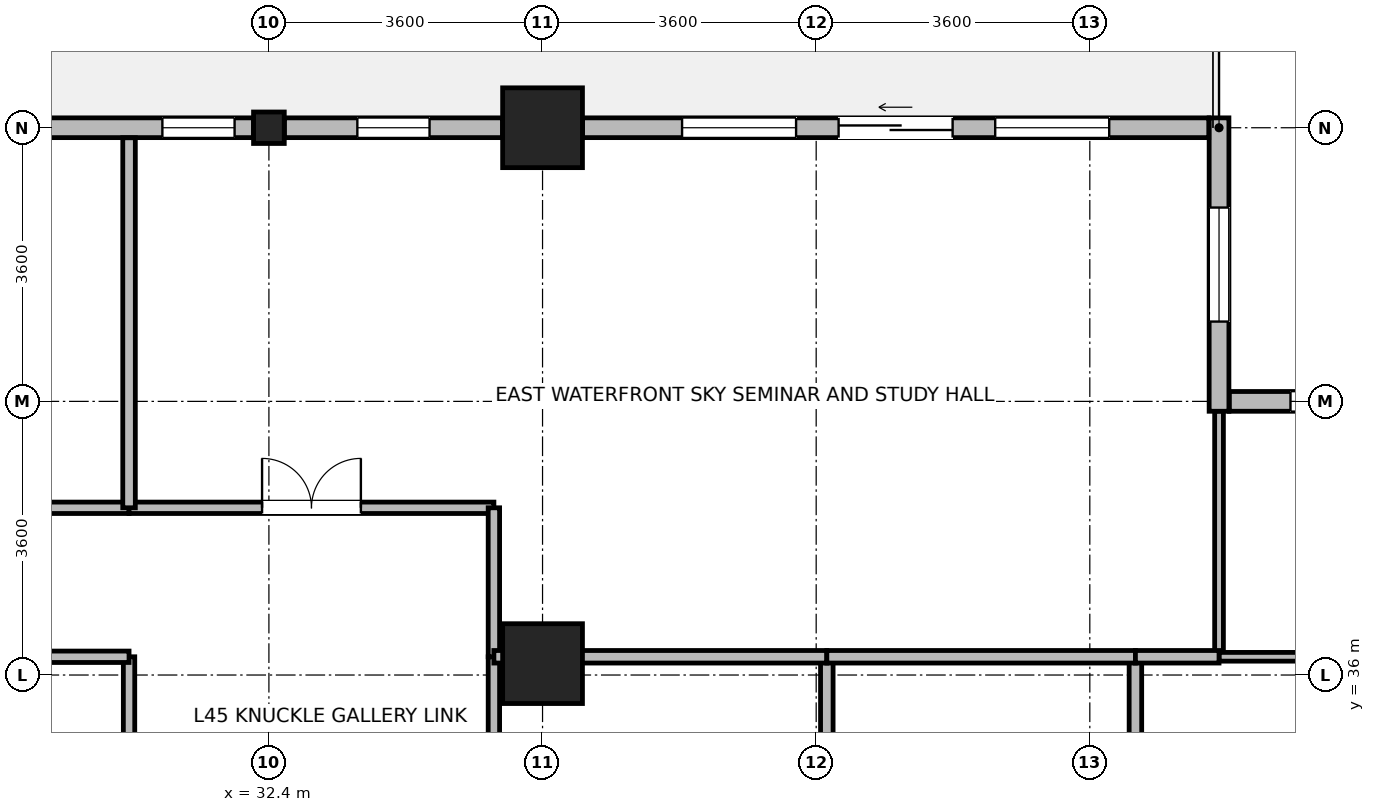
"""IFC4 building model, lengths in metres.
Left out: names, types, materials, properties, quantities, classifications, styles, units other than length and angle.
Written with IfcOpenShell. Run it as: python <this file> out.ifc"""

import sys

from ifc_helpers import new_model, si_unit, direction, frame, frame_2d, origin, origin_2d, place, context, subcontext, project, spatial, rectangle, i_section, extrude, source, transform, mapped, element, fill, save


model = new_model("IFC4")
c1 = context("Model", 3, precision=1e-05, world=origin(), true_north=direction((0.0, 1.0)))
c2 = subcontext(c1, "Body", "Model", "MODEL_VIEW")
j1 = project(units=[si_unit("LENGTHUNIT", "METRE"), si_unit("PLANEANGLEUNIT", "RADIAN")], contexts=[c1])
p1 = place(None, origin())
s1 = spatial("IfcSite", under=j1, at=p1, CompositionType="ELEMENT")
p2 = place(p1, origin())
s2 = spatial("IfcBuilding", under=s1, at=p2, CompositionType="ELEMENT")
p3 = place(p2, frame((0.0, 0.0, 177.2)))
s3 = spatial("IfcBuildingStorey", under=s2, at=p3, CompositionType="ELEMENT", Elevation=177.2)
m1 = source(origin(), c2, "Body", "SweptSolid", [
    extrude(rectangle(XDim=1.05, YDim=1.05, at=origin_2d()), origin(), (0.0, 0.0, 1.0), 3.7),
])
for number, where, z_axis, x_axis in (
    (1, (36.0, 43.2, 0.0), (0.0, 0.0, 1.0), (1.0, 0.0, 0.0)),
    (2, (36.0, 36.15, 0.0), (0.0, 0.0, 1.0), (1.0, 0.0, 0.0)),
):
    element("IfcColumn", number, at=place(p3, frame(where, z_axis=z_axis, x_axis=x_axis)), inside=s3, PredefinedType="COLUMN", context=c2, shape_type="MappedRepresentation", body=[
        mapped(m1, transform((0.0, 0.0, 0.0), x_axis=(1.0, 0.0, 0.0), y_axis=(0.0, 1.0, 0.0), z_axis=(0.0, 0.0, 1.0), scale=1.0)),
    ])
m2 = source(origin(), c2, "Body", "SweptSolid", [
    extrude(i_section(OverallWidth=0.404, OverallDepth=0.414, WebThickness=0.021, FlangeThickness=0.028, FilletRadius=0.015, at=origin_2d()), origin(), (0.0, 0.0, 1.0), 3.7),
])
p4 = place(p3, frame((32.4, 43.2, 0.0), z_axis=(0.0, 0.0, 1.0), x_axis=(1.0, 0.0, 0.0)))
e3 = element("IfcColumn", 3, at=p4, inside=s3, PredefinedType="COLUMN", context=c2, shape_type="MappedRepresentation", body=[
    mapped(m2, transform((0.0, 0.0, 0.0), x_axis=(1.0, 0.0, 0.0), y_axis=(0.0, 1.0, 0.0), z_axis=(0.0, 0.0, 1.0), scale=1.0)),
])
p5 = place(p3, frame((45.035, 39.6, 0.0), z_axis=(0.0, 0.0, 1.0), x_axis=(1.0, 0.0, 0.0)))
e4 = element("IfcWall", 4, at=p5, inside=s3, PredefinedType="STANDARD", context=c2, shape_type="SweptSolid", body=[
    extrude(rectangle(XDim=9.33, YDim=0.26, at=frame_2d((4.665, 0.0))), origin(), (0.0, 0.0, 1.0), 3.44),
])
p6 = place(p5, frame((0.805, 0.0, 0.85)))
e5 = element("IfcOpeningElement", 5, at=p6, cuts=e4, PredefinedType="OPENING", context=c2, shape_type="SweptSolid", body=[
    extrude(rectangle(XDim=1.5, YDim=1.85, at=frame_2d((0.75, 0.925))), frame((0.0, 0.14, 0.0), z_axis=(0.0, -1.0, 0.0), x_axis=(1.0, 0.0, 0.0)), (0.0, 0.0, 1.0), 0.28),
])
p7 = place(p5, frame((3.915, 0.0, 0.85)))
e6 = element("IfcOpeningElement", 6, at=p7, cuts=e4, PredefinedType="OPENING", context=c2, shape_type="SweptSolid", body=[
    extrude(rectangle(XDim=1.5, YDim=1.85, at=frame_2d((0.75, 0.925))), frame((0.0, 0.14, 0.0), z_axis=(0.0, -1.0, 0.0), x_axis=(1.0, 0.0, 0.0)), (0.0, 0.0, 1.0), 0.28),
])
p8 = place(p5, frame((7.025, 0.0, 0.85)))
e7 = element("IfcOpeningElement", 7, at=p8, cuts=e4, PredefinedType="OPENING", context=c2, shape_type="SweptSolid", body=[
    extrude(rectangle(XDim=1.5, YDim=1.85, at=frame_2d((0.75, 0.925))), frame((0.0, 0.14, 0.0), z_axis=(0.0, -1.0, 0.0), x_axis=(1.0, 0.0, 0.0)), (0.0, 0.0, 1.0), 0.28),
])
p9 = place(p3, frame((44.9, 43.33, 0.0), z_axis=(0.0, 0.0, 1.0), x_axis=(0.0, -1.0, 0.0)))
e8 = element("IfcWall", 8, at=p9, inside=s3, PredefinedType="STANDARD", context=c2, shape_type="SweptSolid", body=[
    extrude(rectangle(XDim=3.86, YDim=0.26, at=frame_2d((1.93, 0.0))), origin(), (0.0, 0.0, 1.0), 3.44),
])
p10 = place(p9, frame((1.18, 0.0, 0.85)))
e9 = element("IfcOpeningElement", 9, at=p10, cuts=e8, PredefinedType="OPENING", context=c2, shape_type="SweptSolid", body=[
    extrude(rectangle(XDim=1.5, YDim=1.85, at=frame_2d((0.75, 0.925))), frame((0.0, 0.14, 0.0), z_axis=(0.0, -1.0, 0.0), x_axis=(1.0, 0.0, 0.0)), (0.0, 0.0, 1.0), 0.28),
])
p11 = place(p3, frame((36.526, 43.2, 0.0), z_axis=(0.0, 0.0, 1.0), x_axis=(1.0, 0.0, 0.0)))
e10 = element("IfcWall", 10, at=p11, inside=s3, PredefinedType="STANDARD", context=c2, shape_type="SweptSolid", body=[
    extrude(rectangle(XDim=8.239, YDim=0.26, at=frame_2d((4.12, 0.0))), origin(), (0.0, 0.0, 1.0), 2.99),
])
p12 = place(p11, frame((3.369, 0.0, 0.0)))
e11 = element("IfcOpeningElement", 11, at=p12, cuts=e10, PredefinedType="OPENING", context=c2, shape_type="SweptSolid", body=[
    extrude(rectangle(XDim=1.5, YDim=2.15, at=frame_2d((0.75, 1.075))), frame((0.0, 0.14, 0.0), z_axis=(0.0, -1.0, 0.0), x_axis=(1.0, 0.0, 0.0)), (0.0, 0.0, 1.0), 0.28),
])
p13 = place(p11, frame((1.31, 0.0, 0.85)))
e12 = element("IfcOpeningElement", 12, at=p13, cuts=e10, PredefinedType="OPENING", context=c2, shape_type="SweptSolid", body=[
    extrude(rectangle(XDim=1.5, YDim=1.85, at=frame_2d((0.75, 0.925))), frame((0.0, 0.14, 0.0), z_axis=(0.0, -1.0, 0.0), x_axis=(1.0, 0.0, 0.0)), (0.0, 0.0, 1.0), 0.28),
])
p14 = place(p11, frame((5.429, 0.0, 0.85)))
e13 = element("IfcOpeningElement", 13, at=p14, cuts=e10, PredefinedType="OPENING", context=c2, shape_type="SweptSolid", body=[
    extrude(rectangle(XDim=1.5, YDim=1.85, at=frame_2d((0.75, 0.925))), frame((0.0, 0.14, 0.0), z_axis=(0.0, -1.0, 0.0), x_axis=(1.0, 0.0, 0.0)), (0.0, 0.0, 1.0), 0.28),
])
p15 = place(p3, frame((32.603, 43.2, 0.0), z_axis=(0.0, 0.0, 1.0), x_axis=(1.0, 0.0, 0.0)))
e14 = element("IfcWall", 14, at=p15, inside=s3, PredefinedType="STANDARD", context=c2, shape_type="SweptSolid", body=[
    extrude(rectangle(XDim=2.871, YDim=0.26, at=frame_2d((1.436, 0.0))), origin(), (0.0, 0.0, 1.0), 2.99),
])
p16 = place(p15, frame((0.96, 0.0, 0.85)))
e15 = element("IfcOpeningElement", 15, at=p16, cuts=e14, PredefinedType="OPENING", context=c2, shape_type="SweptSolid", body=[
    extrude(rectangle(XDim=0.95, YDim=1.75, at=frame_2d((0.475, 0.875))), frame((0.0, 0.14, 0.0), z_axis=(0.0, -1.0, 0.0), x_axis=(1.0, 0.0, 0.0)), (0.0, 0.0, 1.0), 0.28),
])
p17 = place(p3, frame((29.326, 43.2, 0.0), z_axis=(0.0, 0.0, 1.0), x_axis=(1.0, 0.0, 0.0)))
e16 = element("IfcWall", 16, at=p17, inside=s3, PredefinedType="STANDARD", context=c2, shape_type="SweptSolid", body=[
    extrude(rectangle(XDim=2.871, YDim=0.26, at=frame_2d((1.436, 0.0))), origin(), (0.0, 0.0, 1.0), 2.99),
])
p18 = place(p17, frame((1.673, 0.0, 0.85)))
e17 = element("IfcOpeningElement", 17, at=p18, cuts=e16, PredefinedType="OPENING", context=c2, shape_type="SweptSolid", body=[
    extrude(rectangle(XDim=0.95, YDim=1.75, at=frame_2d((0.475, 0.875))), frame((0.0, 0.14, 0.0), z_axis=(0.0, -1.0, 0.0), x_axis=(1.0, 0.0, 0.0)), (0.0, 0.0, 1.0), 0.28),
])
p19 = place(p3, frame((35.36, 28.56, 0.0), z_axis=(0.0, 0.0, 1.0), x_axis=(0.0, 1.0, 0.0)))
e18 = element("IfcWall", 18, at=p19, inside=s3, PredefinedType="PARTITIONING", context=c2, shape_type="SweptSolid", body=[
    extrude(rectangle(XDim=7.68, YDim=0.15, at=frame_2d((3.84, 0.0))), origin(), (0.0, 0.0, 1.0), 3.44),
])
p20 = place(p19, frame((3.19, 0.0, 0.0)))
e19 = element("IfcOpeningElement", 19, at=p20, cuts=e18, PredefinedType="OPENING", context=c2, shape_type="SweptSolid", body=[
    extrude(rectangle(XDim=1.3, YDim=2.12, at=frame_2d((0.65, 1.06))), frame((0.0, 0.085, 0.0), z_axis=(0.0, -1.0, 0.0), x_axis=(1.0, 0.0, 0.0)), (0.0, 0.0, 1.0), 0.17),
])
p21 = place(p3, frame((24.5, 38.2, 0.0), z_axis=(0.0, 0.0, 1.0), x_axis=(1.0, 0.0, 0.0)))
e20 = element("IfcWall", 20, at=p21, inside=s3, PredefinedType="PARTITIONING", context=c2, shape_type="SweptSolid", body=[
    extrude(rectangle(XDim=6.06, YDim=0.15, at=frame_2d((3.03, 0.0))), origin(), (0.0, 0.0, 1.0), 3.44),
])
p22 = place(p21, frame((2.58, 0.0, 0.0)))
e21 = element("IfcOpeningElement", 21, at=p22, cuts=e20, PredefinedType="OPENING", context=c2, shape_type="SweptSolid", body=[
    extrude(rectangle(XDim=0.9, YDim=2.08, at=frame_2d((0.45, 1.04))), frame((0.0, 0.085, 0.0), z_axis=(0.0, -1.0, 0.0), x_axis=(1.0, 0.0, 0.0)), (0.0, 0.0, 1.0), 0.17),
])
p23 = place(p3, frame((30.56, 38.2, 0.0), z_axis=(0.0, 0.0, 1.0), x_axis=(1.0, 0.0, 0.0)))
e22 = element("IfcWall", 22, at=p23, inside=s3, PredefinedType="PARTITIONING", context=c2, shape_type="SweptSolid", body=[
    extrude(rectangle(XDim=4.8, YDim=0.15, at=frame_2d((2.4, 0.0))), origin(), (0.0, 0.0, 1.0), 3.44),
])
p24 = place(p23, frame((1.75, 0.0, 0.0)))
e23 = element("IfcOpeningElement", 23, at=p24, cuts=e22, PredefinedType="OPENING", context=c2, shape_type="SweptSolid", body=[
    extrude(rectangle(XDim=1.3, YDim=2.12, at=frame_2d((0.65, 1.06))), frame((0.0, 0.085, 0.0), z_axis=(0.0, -1.0, 0.0), x_axis=(1.0, 0.0, 0.0)), (0.0, 0.0, 1.0), 0.17),
])
p25 = place(p3, frame((30.56, 32.4, 0.0), z_axis=(0.0, 0.0, 1.0), x_axis=(0.0, 1.0, 0.0)))
e24 = element("IfcWall", 24, at=p25, inside=s3, PredefinedType="PARTITIONING", context=c2, shape_type="SweptSolid", body=[
    extrude(rectangle(XDim=3.84, YDim=0.15, at=frame_2d((1.92, 0.0))), origin(), (0.0, 0.0, 1.0), 3.44),
])
p26 = place(p25, frame((1.27, 0.0, 0.0)))
e25 = element("IfcOpeningElement", 25, at=p26, cuts=e24, PredefinedType="OPENING", context=c2, shape_type="SweptSolid", body=[
    extrude(rectangle(XDim=1.3, YDim=2.12, at=frame_2d((0.65, 1.06))), frame((0.0, 0.085, 0.0), z_axis=(0.0, -1.0, 0.0), x_axis=(1.0, 0.0, 0.0)), (0.0, 0.0, 1.0), 0.17),
])
p27 = place(p3, frame((35.36, 36.24, 0.0), z_axis=(0.0, 0.0, 1.0), x_axis=(0.0, 1.0, 0.0)))
e26 = element("IfcWall", 26, at=p27, inside=s3, PredefinedType="PARTITIONING", context=c2, shape_type="SweptSolid", body=[
    extrude(rectangle(XDim=1.96, YDim=0.15, at=frame_2d((0.98, 0.0))), origin(), (0.0, 0.0, 1.0), 3.44),
])
p28 = place(p3, frame((29.325, 36.24, 0.0), z_axis=(0.0, 0.0, 1.0), x_axis=(1.0, 0.0, 0.0)))
e27 = element("IfcWall", 27, at=p28, inside=s3, PredefinedType="PARTITIONING", context=c2, shape_type="SweptSolid", body=[
    extrude(rectangle(XDim=1.235, YDim=0.15, at=frame_2d((0.618, 0.0))), origin(), (0.0, 0.0, 1.0), 2.84),
])
for number, where, z_axis, x_axis in (
    (28, (39.74, 28.56, 0.0), (0.0, 0.0, 1.0), (0.0, 1.0, 0.0)),
    (29, (43.8, 28.56, 0.0), (0.0, 0.0, 1.0), (0.0, 1.0, 0.0)),
):
    element("IfcWall", number, at=place(p3, frame(where, z_axis=z_axis, x_axis=x_axis)), inside=s3, PredefinedType="PARTITIONING", context=c2, shape_type="SweptSolid", body=[
        extrude(rectangle(XDim=7.68, YDim=0.165, at=frame_2d((3.84, 0.0))), origin(), (0.0, 0.0, 1.0), 3.44),
    ])
p29 = place(p3, frame((44.9, 36.24, 0.0), z_axis=(0.0, 0.0, 1.0), x_axis=(0.0, 1.0, 0.0)))
e30 = element("IfcWall", 30, at=p29, inside=s3, PredefinedType="PARTITIONING", context=c2, shape_type="SweptSolid", body=[
    extrude(rectangle(XDim=3.228, YDim=0.115, at=frame_2d((1.614, 0.0))), origin(), (0.0, 0.0, 1.0), 3.44),
])
p30 = place(p3, frame((30.56, 38.2, 0.0), z_axis=(0.0, 0.0, 1.0), x_axis=(0.0, 1.0, 0.0)))
e31 = element("IfcWall", 31, at=p30, inside=s3, PredefinedType="PARTITIONING", context=c2, shape_type="SweptSolid", body=[
    extrude(rectangle(XDim=4.868, YDim=0.165, at=frame_2d((2.434, 0.0))), origin(), (0.0, 0.0, 1.0), 3.44),
])
p31 = place(p3, frame((35.36, 36.24, 0.0), z_axis=(0.0, 0.0, 1.0), x_axis=(1.0, 0.0, 0.0)))
e32 = element("IfcWall", 32, at=p31, inside=s3, PredefinedType="PARTITIONING", context=c2, shape_type="SweptSolid", body=[
    extrude(rectangle(XDim=4.38, YDim=0.165, at=frame_2d((2.19, 0.0))), origin(), (0.0, 0.0, 1.0), 2.84),
])
p32 = place(p3, frame((39.74, 36.24, 0.0), z_axis=(0.0, 0.0, 1.0), x_axis=(1.0, 0.0, 0.0)))
e33 = element("IfcWall", 33, at=p32, inside=s3, PredefinedType="PARTITIONING", context=c2, shape_type="SweptSolid", body=[
    extrude(rectangle(XDim=4.06, YDim=0.165, at=frame_2d((2.03, 0.0))), origin(), (0.0, 0.0, 1.0), 2.84),
])
p33 = place(p3, frame((44.9, 36.24, 0.0), z_axis=(0.0, 0.0, 1.0), x_axis=(1.0, 0.0, 0.0)))
e34 = element("IfcWall", 34, at=p33, inside=s3, PredefinedType="PARTITIONING", context=c2, shape_type="SweptSolid", body=[
    extrude(rectangle(XDim=1.375, YDim=0.115, at=frame_2d((0.688, 0.0))), origin(), (0.0, 0.0, 1.0), 2.84),
])
p34 = place(p3, frame((43.8, 36.24, 0.0), z_axis=(0.0, 0.0, 1.0), x_axis=(1.0, 0.0, 0.0)))
e35 = element("IfcWall", 35, at=p34, inside=s3, PredefinedType="PARTITIONING", context=c2, shape_type="SweptSolid", body=[
    extrude(rectangle(XDim=1.1, YDim=0.165, at=frame_2d((0.55, 0.0))), origin(), (0.0, 0.0, 1.0), 2.84),
])
p35 = place(p6, origin())
e36 = element("IfcWindow", 36, at=p35, inside=s3, PartitioningType="SINGLE_PANEL", PredefinedType="WINDOW", context=c2, shape_type="SweptSolid", body=[
    extrude(rectangle(XDim=1.5, YDim=1.85, at=frame_2d((0.75, 0.925))), frame((0.0, 0.03, 0.0), z_axis=(0.0, -1.0, 0.0), x_axis=(1.0, 0.0, 0.0)), (0.0, 0.0, 1.0), 0.06),
])
fill(e5, e36)
p36 = place(p10, origin())
e37 = element("IfcWindow", 37, at=p36, inside=s3, PartitioningType="SINGLE_PANEL", PredefinedType="WINDOW", context=c2, shape_type="SweptSolid", body=[
    extrude(rectangle(XDim=1.5, YDim=1.85, at=frame_2d((0.75, 0.925))), frame((0.0, 0.03, 0.0), z_axis=(0.0, -1.0, 0.0), x_axis=(1.0, 0.0, 0.0)), (0.0, 0.0, 1.0), 0.06),
])
fill(e9, e37)
p37 = place(p12, origin())
e38 = element("IfcDoor", 38, at=p37, inside=s3, OperationType="SLIDING_TO_LEFT", PredefinedType="DOOR", context=c2, shape_type="SweptSolid", body=[
    extrude(rectangle(XDim=1.5, YDim=2.15, at=frame_2d((0.75, 1.075))), frame((0.0, 0.025, 0.0), z_axis=(0.0, -1.0, 0.0), x_axis=(1.0, 0.0, 0.0)), (0.0, 0.0, 1.0), 0.05),
])
fill(e11, e38)
p38 = place(p13, origin())
e39 = element("IfcWindow", 39, at=p38, inside=s3, PartitioningType="SINGLE_PANEL", PredefinedType="WINDOW", context=c2, shape_type="SweptSolid", body=[
    extrude(rectangle(XDim=1.5, YDim=1.85, at=frame_2d((0.75, 0.925))), frame((0.0, 0.03, 0.0), z_axis=(0.0, -1.0, 0.0), x_axis=(1.0, 0.0, 0.0)), (0.0, 0.0, 1.0), 0.06),
])
fill(e12, e39)
p39 = place(p14, origin())
e40 = element("IfcWindow", 40, at=p39, inside=s3, PartitioningType="SINGLE_PANEL", PredefinedType="WINDOW", context=c2, shape_type="SweptSolid", body=[
    extrude(rectangle(XDim=1.5, YDim=1.85, at=frame_2d((0.75, 0.925))), frame((0.0, 0.03, 0.0), z_axis=(0.0, -1.0, 0.0), x_axis=(1.0, 0.0, 0.0)), (0.0, 0.0, 1.0), 0.06),
])
fill(e13, e40)
p40 = place(p16, origin())
e41 = element("IfcWindow", 41, at=p40, inside=s3, PartitioningType="SINGLE_PANEL", PredefinedType="WINDOW", context=c2, shape_type="SweptSolid", body=[
    extrude(rectangle(XDim=0.95, YDim=1.75, at=frame_2d((0.475, 0.875))), frame((0.0, 0.03, 0.0), z_axis=(0.0, -1.0, 0.0), x_axis=(1.0, 0.0, 0.0)), (0.0, 0.0, 1.0), 0.06),
])
fill(e15, e41)
p41 = place(p18, origin())
e42 = element("IfcWindow", 42, at=p41, inside=s3, PartitioningType="SINGLE_PANEL", PredefinedType="WINDOW", context=c2, shape_type="SweptSolid", body=[
    extrude(rectangle(XDim=0.95, YDim=1.75, at=frame_2d((0.475, 0.875))), frame((0.0, 0.03, 0.0), z_axis=(0.0, -1.0, 0.0), x_axis=(1.0, 0.0, 0.0)), (0.0, 0.0, 1.0), 0.06),
])
fill(e17, e42)
p42 = place(p24, origin())
e43 = element("IfcDoor", 43, at=p42, inside=s3, OperationType="DOUBLE_DOOR_SINGLE_SWING", PredefinedType="DOOR", context=c2, shape_type="SweptSolid", body=[
    extrude(rectangle(XDim=1.3, YDim=2.12, at=frame_2d((0.65, 1.06))), frame((0.0, 0.025, 0.0), z_axis=(0.0, -1.0, 0.0), x_axis=(1.0, 0.0, 0.0)), (0.0, 0.0, 1.0), 0.05),
])
fill(e23, e43)
save(model, sys.argv[1])
